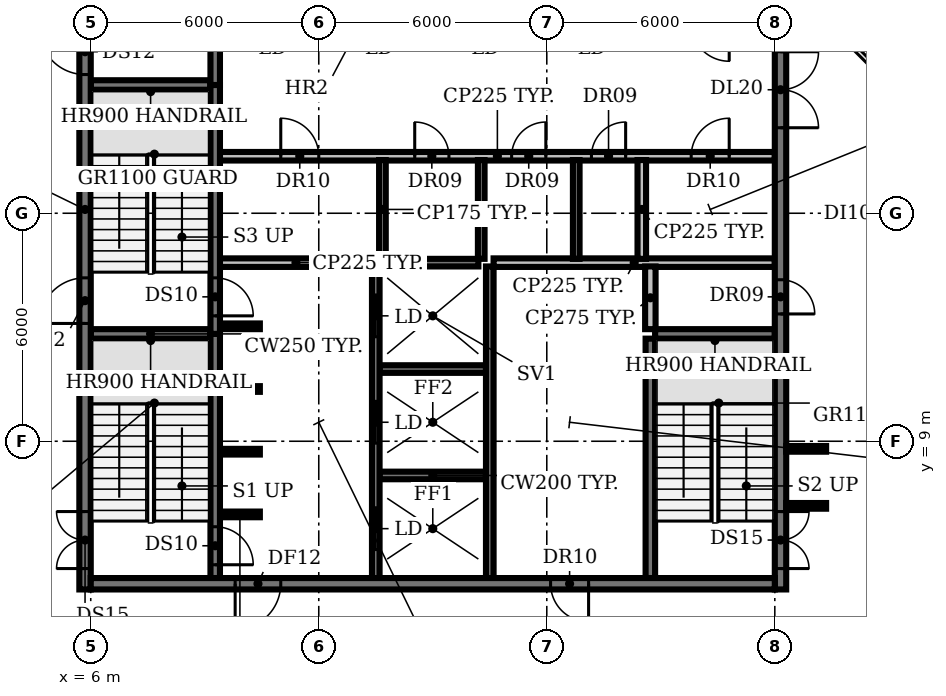
"""IFC4 building model, lengths in metres.
Left out: names, types, materials, properties, quantities, classifications, styles, units other than length and angle.
Written with IfcOpenShell. Run it as: python <this file> out.ifc"""

import sys

from ifc_helpers import new_model, si_unit, direction, frame, frame_2d, origin, place, context, subcontext, project, spatial, rectangle, extrude, element, fill, save


model = new_model("IFC4")
c1 = context("Model", 3, precision=1e-05, world=origin(), true_north=direction((0.0, 1.0)))
c2 = subcontext(c1, "Body", "Model", "MODEL_VIEW")
j1 = project(units=[si_unit("LENGTHUNIT", "METRE"), si_unit("PLANEANGLEUNIT", "RADIAN")], contexts=[c1])
p1 = place(None, origin())
s1 = spatial("IfcSite", under=j1, at=p1, CompositionType="ELEMENT")
p2 = place(p1, origin())
s2 = spatial("IfcBuilding", under=s1, at=p2, CompositionType="ELEMENT")
p3 = place(p2, frame((0.0, 0.0, 276.8)))
s3 = spatial("IfcBuildingStorey", under=s2, at=p3, CompositionType="ELEMENT", Elevation=276.8)
p4 = place(p3, frame((9.4, 7.075, 0.0), z_axis=(0.0, 0.0, 1.0), x_axis=(1.0, 0.0, 0.0)))
e1 = element("IfcWall", 1, at=p4, inside=s3, PredefinedType="SHEAR", context=c2, shape_type="SweptSolid", body=[
    extrude(rectangle(XDim=1.05, YDim=0.15, at=frame_2d((0.525, 0.0))), origin(), (0.0, 0.0, 1.0), 3.85),
])
p5 = place(p3, frame((13.6, 8.1, 0.0), z_axis=(0.0, 0.0, 1.0), x_axis=(1.0, 0.0, 0.0)))
e2 = element("IfcWall", 2, at=p5, inside=s3, PredefinedType="SHEAR", context=c2, shape_type="SweptSolid", body=[
    extrude(rectangle(XDim=2.8, YDim=0.2, at=frame_2d((1.4, 0.0))), origin(), (0.0, 0.0, 1.0), 3.85),
])
for number, where, z_axis, x_axis in (
    (3, (9.4, 8.725, 0.0), (0.0, 0.0, 1.0), (1.0, 0.0, 0.0)),
    (4, (9.4, 10.375, 0.0), (0.0, 0.0, 1.0), (1.0, 0.0, 0.0)),
):
    element("IfcWall", number, at=place(p3, frame(where, z_axis=z_axis, x_axis=x_axis)), inside=s3, PredefinedType="SHEAR", context=c2, shape_type="SweptSolid", body=[
        extrude(rectangle(XDim=1.05, YDim=0.15, at=frame_2d((0.525, 0.0))), origin(), (0.0, 0.0, 1.0), 3.85),
    ])
p6 = place(p3, frame((13.6, 10.9, 0.0), z_axis=(0.0, 0.0, 1.0), x_axis=(1.0, 0.0, 0.0)))
e5 = element("IfcWall", 5, at=p6, inside=s3, PredefinedType="SHEAR", context=c2, shape_type="SweptSolid", body=[
    extrude(rectangle(XDim=2.8, YDim=0.2, at=frame_2d((1.4, 0.0))), origin(), (0.0, 0.0, 1.0), 3.85),
])
for number, where, z_axis, x_axis in (
    (6, (6.0, 11.825, 0.0), (0.0, 0.0, 1.0), (1.0, 0.0, 0.0)),
    (7, (20.85, 11.825, 0.0), (0.0, 0.0, 1.0), (1.0, 0.0, 0.0)),
):
    element("IfcWall", number, at=place(p3, frame(where, z_axis=z_axis, x_axis=x_axis)), inside=s3, PredefinedType="SHEAR", context=c2, shape_type="SweptSolid", body=[
        extrude(rectangle(XDim=3.15, YDim=0.25, at=frame_2d((1.575, 0.0))), origin(), (0.0, 0.0, 1.0), 3.85),
    ])
p7 = place(p3, frame((9.4, 12.025, 0.0), z_axis=(0.0, 0.0, 1.0), x_axis=(1.0, 0.0, 0.0)))
e8 = element("IfcWall", 8, at=p7, inside=s3, PredefinedType="SHEAR", context=c2, shape_type="SweptSolid", body=[
    extrude(rectangle(XDim=1.05, YDim=0.15, at=frame_2d((0.525, 0.0))), origin(), (0.0, 0.0, 1.0), 3.85),
])
p8 = place(p3, frame((9.4, 13.7, 0.0), z_axis=(0.0, 0.0, 1.0), x_axis=(1.0, 0.0, 0.0)))
e9 = element("IfcWall", 9, at=p8, inside=s3, PredefinedType="PARTITIONING", context=c2, shape_type="SweptSolid", body=[
    extrude(rectangle(XDim=4.0, YDim=0.225, at=frame_2d((2.0, 0.0))), origin(), (0.0, 0.0, 1.0), 3.85),
])
p9 = place(p3, frame((13.75, 13.7, 0.0), z_axis=(0.0, 0.0, 1.0), x_axis=(1.0, 0.0, 0.0)))
e10 = element("IfcWall", 10, at=p9, inside=s3, PredefinedType="SHEAR", context=c2, shape_type="SweptSolid", body=[
    extrude(rectangle(XDim=2.45, YDim=0.2, at=frame_2d((1.225, 0.0))), origin(), (0.0, 0.0, 1.0), 3.85),
])
p10 = place(p3, frame((16.6, 13.7, 0.0), z_axis=(0.0, 0.0, 1.0), x_axis=(1.0, 0.0, 0.0)))
e11 = element("IfcWall", 11, at=p10, inside=s3, PredefinedType="PARTITIONING", context=c2, shape_type="SweptSolid", body=[
    extrude(rectangle(XDim=7.4, YDim=0.225, at=frame_2d((3.7, 0.0))), origin(), (0.0, 0.0, 1.0), 3.85),
])
p11 = place(p3, frame((9.4, 16.5, 0.0), z_axis=(0.0, 0.0, 1.0), x_axis=(1.0, 0.0, 0.0)))
e12 = element("IfcWall", 12, at=p11, inside=s3, PredefinedType="PARTITIONING", context=c2, shape_type="SweptSolid", body=[
    extrude(rectangle(XDim=14.6, YDim=0.225, at=frame_2d((7.3, 0.0))), origin(), (0.0, 0.0, 1.0), 3.85),
])
p12 = place(p11, frame((1.6, 0.0, 0.0)))
e13 = element("IfcOpeningElement", 13, at=p12, cuts=e12, PredefinedType="OPENING", context=c2, shape_type="SweptSolid", body=[
    extrude(rectangle(XDim=1.0, YDim=2.1, at=frame_2d((0.5, 1.05))), frame((0.0, 0.123, 0.0), z_axis=(0.0, -1.0, 0.0), x_axis=(1.0, 0.0, 0.0)), (0.0, 0.0, 1.0), 0.245),
])
p13 = place(p11, frame((5.125, 0.0, 0.0)))
e14 = element("IfcOpeningElement", 14, at=p13, cuts=e12, PredefinedType="OPENING", context=c2, shape_type="SweptSolid", body=[
    extrude(rectangle(XDim=0.9, YDim=2.1, at=frame_2d((0.45, 1.05))), frame((0.0, 0.123, 0.0), z_axis=(0.0, -1.0, 0.0), x_axis=(1.0, 0.0, 0.0)), (0.0, 0.0, 1.0), 0.245),
])
p14 = place(p11, frame((7.675, 0.0, 0.0)))
e15 = element("IfcOpeningElement", 15, at=p14, cuts=e12, PredefinedType="OPENING", context=c2, shape_type="SweptSolid", body=[
    extrude(rectangle(XDim=0.9, YDim=2.1, at=frame_2d((0.45, 1.05))), frame((0.0, 0.123, 0.0), z_axis=(0.0, -1.0, 0.0), x_axis=(1.0, 0.0, 0.0)), (0.0, 0.0, 1.0), 0.245),
])
p15 = place(p11, frame((9.775, 0.0, 0.0)))
e16 = element("IfcOpeningElement", 16, at=p15, cuts=e12, PredefinedType="OPENING", context=c2, shape_type="SweptSolid", body=[
    extrude(rectangle(XDim=0.9, YDim=2.1, at=frame_2d((0.45, 1.05))), frame((0.0, 0.123, 0.0), z_axis=(0.0, -1.0, 0.0), x_axis=(1.0, 0.0, 0.0)), (0.0, 0.0, 1.0), 0.245),
])
p16 = place(p11, frame((12.4, 0.0, 0.0)))
e17 = element("IfcOpeningElement", 17, at=p16, cuts=e12, PredefinedType="OPENING", context=c2, shape_type="SweptSolid", body=[
    extrude(rectangle(XDim=1.0, YDim=2.1, at=frame_2d((0.5, 1.05))), frame((0.0, 0.123, 0.0), z_axis=(0.0, -1.0, 0.0), x_axis=(1.0, 0.0, 0.0)), (0.0, 0.0, 1.0), 0.245),
])
p17 = place(p3, frame((6.0, 18.375, 0.0), z_axis=(0.0, 0.0, 1.0), x_axis=(1.0, 0.0, 0.0)))
e18 = element("IfcWall", 18, at=p17, inside=s3, PredefinedType="SHEAR", context=c2, shape_type="SweptSolid", body=[
    extrude(rectangle(XDim=3.15, YDim=0.25, at=frame_2d((1.575, 0.0))), origin(), (0.0, 0.0, 1.0), 3.85),
])
p18 = place(p3, frame((9.275, 11.825, 0.0), z_axis=(0.0, 0.0, 1.0), x_axis=(0.0, -1.0, 0.0)))
e19 = element("IfcWall", 19, at=p18, inside=s3, PredefinedType="SHEAR", context=c2, shape_type="SweptSolid", body=[
    extrude(rectangle(XDim=6.425, YDim=0.25, at=frame_2d((3.212, 0.0))), origin(), (0.0, 0.0, 1.0), 3.85),
])
p19 = place(p18, frame((5.075, 0.0, 0.0)))
e20 = element("IfcOpeningElement", 20, at=p19, cuts=e19, PredefinedType="OPENING", context=c2, shape_type="SweptSolid", body=[
    extrude(rectangle(XDim=1.0, YDim=2.1, at=frame_2d((0.5, 1.05))), frame((0.0, 0.135, 0.0), z_axis=(0.0, -1.0, 0.0), x_axis=(1.0, 0.0, 0.0)), (0.0, 0.0, 1.0), 0.27),
])
p20 = place(p3, frame((9.275, 18.375, 0.0), z_axis=(0.0, 0.0, 1.0), x_axis=(0.0, -1.0, 0.0)))
e21 = element("IfcWall", 21, at=p20, inside=s3, PredefinedType="SHEAR", context=c2, shape_type="SweptSolid", body=[
    extrude(rectangle(XDim=6.55, YDim=0.25, at=frame_2d((3.275, 0.0))), origin(), (0.0, 0.0, 1.0), 3.85),
])
p21 = place(p20, frame((5.075, 0.0, 0.0)))
e22 = element("IfcOpeningElement", 22, at=p21, cuts=e21, PredefinedType="OPENING", context=c2, shape_type="SweptSolid", body=[
    extrude(rectangle(XDim=1.0, YDim=2.1, at=frame_2d((0.5, 1.05))), frame((0.0, 0.135, 0.0), z_axis=(0.0, -1.0, 0.0), x_axis=(1.0, 0.0, 0.0)), (0.0, 0.0, 1.0), 0.27),
])
p22 = place(p3, frame((9.275, 18.375, 0.0), z_axis=(0.0, 0.0, 1.0), x_axis=(0.0, 1.0, 0.0)))
e23 = element("IfcWall", 23, at=p22, inside=s3, PredefinedType="SHEAR", context=c2, shape_type="SweptSolid", body=[
    extrude(rectangle(XDim=6.425, YDim=0.25, at=frame_2d((3.212, 0.0))), origin(), (0.0, 0.0, 1.0), 3.85),
])
p23 = place(p3, frame((13.5, 5.4, 0.0), z_axis=(0.0, 0.0, 1.0), x_axis=(0.0, 1.0, 0.0)))
e24 = element("IfcWall", 24, at=p23, inside=s3, PredefinedType="SHEAR", context=c2, shape_type="SweptSolid", body=[
    extrude(rectangle(XDim=8.2, YDim=0.2, at=frame_2d((4.1, 0.0))), origin(), (0.0, 0.0, 1.0), 3.85),
])
p24 = place(p23, frame((0.75, 0.0, 0.0)))
e25 = element("IfcOpeningElement", 25, at=p24, cuts=e24, PredefinedType="OPENING", context=c2, shape_type="SweptSolid", body=[
    extrude(rectangle(XDim=1.1, YDim=2.1, at=frame_2d((0.55, 1.05))), frame((0.0, 0.11, 0.0), z_axis=(0.0, -1.0, 0.0), x_axis=(1.0, 0.0, 0.0)), (0.0, 0.0, 1.0), 0.22),
])
p25 = place(p23, frame((3.55, 0.0, 0.0)))
e26 = element("IfcOpeningElement", 26, at=p25, cuts=e24, PredefinedType="OPENING", context=c2, shape_type="SweptSolid", body=[
    extrude(rectangle(XDim=1.1, YDim=2.1, at=frame_2d((0.55, 1.05))), frame((0.0, 0.11, 0.0), z_axis=(0.0, -1.0, 0.0), x_axis=(1.0, 0.0, 0.0)), (0.0, 0.0, 1.0), 0.22),
])
p26 = place(p23, frame((6.35, 0.0, 0.0)))
e27 = element("IfcOpeningElement", 27, at=p26, cuts=e24, PredefinedType="OPENING", context=c2, shape_type="SweptSolid", body=[
    extrude(rectangle(XDim=1.1, YDim=2.1, at=frame_2d((0.55, 1.05))), frame((0.0, 0.11, 0.0), z_axis=(0.0, -1.0, 0.0), x_axis=(1.0, 0.0, 0.0)), (0.0, 0.0, 1.0), 0.22),
])
for number, where, z_axis, x_axis in (
    (28, (13.675, 13.8, 0.0), (0.0, 0.0, 1.0), (0.0, 1.0, 0.0)),
    (29, (16.275, 13.8, 0.0), (0.0, 0.0, 1.0), (0.0, 1.0, 0.0)),
):
    element("IfcWall", number, at=place(p3, frame(where, z_axis=z_axis, x_axis=x_axis)), inside=s3, PredefinedType="PARTITIONING", context=c2, shape_type="SweptSolid", body=[
        extrude(rectangle(XDim=2.6, YDim=0.175, at=frame_2d((1.3, 0.0))), origin(), (0.0, 0.0, 1.0), 3.85),
    ])
p27 = place(p3, frame((16.5, 5.4, 0.0), z_axis=(0.0, 0.0, 1.0), x_axis=(0.0, 1.0, 0.0)))
e30 = element("IfcWall", 30, at=p27, inside=s3, PredefinedType="SHEAR", context=c2, shape_type="SweptSolid", body=[
    extrude(rectangle(XDim=8.2, YDim=0.2, at=frame_2d((4.1, 0.0))), origin(), (0.0, 0.0, 1.0), 3.85),
])
p28 = place(p3, frame((18.775, 13.8, 0.0), z_axis=(0.0, 0.0, 1.0), x_axis=(0.0, 1.0, 0.0)))
e31 = element("IfcWall", 31, at=p28, inside=s3, PredefinedType="PARTITIONING", context=c2, shape_type="SweptSolid", body=[
    extrude(rectangle(XDim=2.6, YDim=0.175, at=frame_2d((1.3, 0.0))), origin(), (0.0, 0.0, 1.0), 3.85),
])
p29 = place(p3, frame((20.5, 13.8, 0.0), z_axis=(0.0, 0.0, 1.0), x_axis=(0.0, 1.0, 0.0)))
e32 = element("IfcWall", 32, at=p29, inside=s3, PredefinedType="PARTITIONING", context=c2, shape_type="SweptSolid", body=[
    extrude(rectangle(XDim=2.6, YDim=0.225, at=frame_2d((1.3, 0.0))), origin(), (0.0, 0.0, 1.0), 3.85),
])
p30 = place(p3, frame((20.725, 5.4, 0.0), z_axis=(0.0, 0.0, 1.0), x_axis=(0.0, 1.0, 0.0)))
e33 = element("IfcWall", 33, at=p30, inside=s3, PredefinedType="SHEAR", context=c2, shape_type="SweptSolid", body=[
    extrude(rectangle(XDim=6.3, YDim=0.25, at=frame_2d((3.15, 0.0))), origin(), (0.0, 0.0, 1.0), 3.85),
])
p31 = place(p3, frame((20.725, 11.95, 0.0), z_axis=(0.0, 0.0, 1.0), x_axis=(0.0, 1.0, 0.0)))
e34 = element("IfcWall", 34, at=p31, inside=s3, PredefinedType="PARTITIONING", context=c2, shape_type="SweptSolid", body=[
    extrude(rectangle(XDim=1.65, YDim=0.275, at=frame_2d((0.825, 0.0))), origin(), (0.0, 0.0, 1.0), 3.85),
])
p32 = place(p3, frame((5.85, 5.1, 0.0), z_axis=(0.0, 0.0, 1.0), x_axis=(0.0, 1.0, 0.0)))
e35 = element("IfcWall", 35, at=p32, inside=s3, PredefinedType="SHEAR", context=c2, shape_type="SweptSolid", body=[
    extrude(rectangle(XDim=20.0, YDim=0.3, at=frame_2d((10.0, 0.0))), origin(), (0.0, 0.0, 1.0), 3.85),
])
p33 = place(p32, frame((0.55, 0.0, 0.0)))
e36 = element("IfcOpeningElement", 36, at=p33, cuts=e35, PredefinedType="OPENING", context=c2, shape_type="SweptSolid", body=[
    extrude(rectangle(XDim=1.5, YDim=2.1, at=frame_2d((0.75, 1.05))), frame((0.0, 0.16, 0.0), z_axis=(0.0, -1.0, 0.0), x_axis=(1.0, 0.0, 0.0)), (0.0, 0.0, 1.0), 0.32),
])
p34 = place(p32, frame((7.0, 0.0, 0.0)))
e37 = element("IfcOpeningElement", 37, at=p34, cuts=e35, PredefinedType="OPENING", context=c2, shape_type="SweptSolid", body=[
    extrude(rectangle(XDim=1.2, YDim=2.1, at=frame_2d((0.6, 1.05))), frame((0.0, 0.16, 0.0), z_axis=(0.0, -1.0, 0.0), x_axis=(1.0, 0.0, 0.0)), (0.0, 0.0, 1.0), 0.32),
])
p35 = place(p32, frame((13.55, 0.0, 0.0)))
e38 = element("IfcOpeningElement", 38, at=p35, cuts=e35, PredefinedType="OPENING", context=c2, shape_type="SweptSolid", body=[
    extrude(rectangle(XDim=1.2, YDim=2.1, at=frame_2d((0.6, 1.05))), frame((0.0, 0.16, 0.0), z_axis=(0.0, -1.0, 0.0), x_axis=(1.0, 0.0, 0.0)), (0.0, 0.0, 1.0), 0.32),
])
p36 = place(p3, frame((24.15, 25.655, 0.0), z_axis=(0.0, 0.0, 1.0), x_axis=(0.0, -1.0, 0.0)))
e39 = element("IfcWall", 39, at=p36, inside=s3, PredefinedType="SHEAR", context=c2, shape_type="SweptSolid", body=[
    extrude(rectangle(XDim=20.555, YDim=0.3, at=frame_2d((10.277, 0.0))), origin(), (0.0, 0.0, 1.0), 3.85),
])
p37 = place(p36, frame((18.505, 0.0, 0.0)))
e40 = element("IfcOpeningElement", 40, at=p37, cuts=e39, PredefinedType="OPENING", context=c2, shape_type="SweptSolid", body=[
    extrude(rectangle(XDim=1.5, YDim=2.1, at=frame_2d((0.75, 1.05))), frame((0.0, 0.16, 0.0), z_axis=(0.0, -1.0, 0.0), x_axis=(1.0, 0.0, 0.0)), (0.0, 0.0, 1.0), 0.32),
])
p38 = place(p36, frame((12.405, 0.0, 0.0)))
e41 = element("IfcOpeningElement", 41, at=p38, cuts=e39, PredefinedType="OPENING", context=c2, shape_type="SweptSolid", body=[
    extrude(rectangle(XDim=0.9, YDim=2.1, at=frame_2d((0.45, 1.05))), frame((0.0, 0.16, 0.0), z_axis=(0.0, -1.0, 0.0), x_axis=(1.0, 0.0, 0.0)), (0.0, 0.0, 1.0), 0.32),
])
p39 = place(p36, frame((6.405, 0.0, 0.0)))
e42 = element("IfcOpeningElement", 42, at=p39, cuts=e39, PredefinedType="OPENING", context=c2, shape_type="SweptSolid", body=[
    extrude(rectangle(XDim=2.0, YDim=2.1, at=frame_2d((1.0, 1.05))), frame((0.0, 0.16, 0.0), z_axis=(0.0, -1.0, 0.0), x_axis=(1.0, 0.0, 0.0)), (0.0, 0.0, 1.0), 0.32),
])
p40 = place(p3, frame((24.0, 5.25, 0.0), z_axis=(0.0, 0.0, 1.0), x_axis=(-1.0, 0.0, 0.0)))
e43 = element("IfcWall", 43, at=p40, inside=s3, PredefinedType="SHEAR", context=c2, shape_type="SweptSolid", body=[
    extrude(rectangle(XDim=18.0, YDim=0.3, at=frame_2d((9.0, 0.0))), origin(), (0.0, 0.0, 1.0), 3.85),
])
p41 = place(p40, frame((13.0, 0.0, 0.0)))
e44 = element("IfcOpeningElement", 44, at=p41, cuts=e43, PredefinedType="OPENING", context=c2, shape_type="SweptSolid", body=[
    extrude(rectangle(XDim=1.2, YDim=2.1, at=frame_2d((0.6, 1.05))), frame((0.0, 0.16, 0.0), z_axis=(0.0, -1.0, 0.0), x_axis=(1.0, 0.0, 0.0)), (0.0, 0.0, 1.0), 0.32),
])
p42 = place(p40, frame((4.9, 0.0, 0.0)))
e45 = element("IfcOpeningElement", 45, at=p42, cuts=e43, PredefinedType="OPENING", context=c2, shape_type="SweptSolid", body=[
    extrude(rectangle(XDim=1.0, YDim=2.1, at=frame_2d((0.5, 1.05))), frame((0.0, 0.16, 0.0), z_axis=(0.0, -1.0, 0.0), x_axis=(1.0, 0.0, 0.0)), (0.0, 0.0, 1.0), 0.32),
])
for number, where, z_axis, x_axis in (
    (46, (24.3, 7.3, 0.0), (0.0, 0.0, 1.0), (1.0, 0.0, 0.0)),
    (47, (24.3, 8.8, 0.0), (0.0, 0.0, 1.0), (1.0, 0.0, 0.0)),
):
    element("IfcWall", number, at=place(p3, frame(where, z_axis=z_axis, x_axis=x_axis)), inside=s3, PredefinedType="PARTITIONING", context=c2, shape_type="SweptSolid", body=[
        extrude(rectangle(XDim=1.05, YDim=0.15, at=frame_2d((0.525, 0.0))), origin(), (0.0, 0.0, 1.0), 2.9),
    ])
p43 = place(p12, origin())
e48 = element("IfcDoor", 48, at=p43, inside=s3, OperationType="SINGLE_SWING_LEFT", PredefinedType="DOOR", context=c2, shape_type="SweptSolid", body=[
    extrude(rectangle(XDim=1.0, YDim=2.1, at=frame_2d((0.5, 1.05))), frame((0.0, 0.025, 0.0), z_axis=(0.0, -1.0, 0.0), x_axis=(1.0, 0.0, 0.0)), (0.0, 0.0, 1.0), 0.05),
])
fill(e13, e48)
p44 = place(p13, origin())
e49 = element("IfcDoor", 49, at=p44, inside=s3, OperationType="SINGLE_SWING_LEFT", PredefinedType="DOOR", context=c2, shape_type="SweptSolid", body=[
    extrude(rectangle(XDim=0.9, YDim=2.1, at=frame_2d((0.45, 1.05))), frame((0.0, 0.025, 0.0), z_axis=(0.0, -1.0, 0.0), x_axis=(1.0, 0.0, 0.0)), (0.0, 0.0, 1.0), 0.05),
])
fill(e14, e49)
p45 = place(p14, origin())
e50 = element("IfcDoor", 50, at=p45, inside=s3, OperationType="SINGLE_SWING_RIGHT", PredefinedType="DOOR", context=c2, shape_type="SweptSolid", body=[
    extrude(rectangle(XDim=0.9, YDim=2.1, at=frame_2d((0.45, 1.05))), frame((0.0, 0.025, 0.0), z_axis=(0.0, -1.0, 0.0), x_axis=(1.0, 0.0, 0.0)), (0.0, 0.0, 1.0), 0.05),
])
fill(e15, e50)
p46 = place(p15, origin())
e51 = element("IfcDoor", 51, at=p46, inside=s3, OperationType="SINGLE_SWING_RIGHT", PredefinedType="DOOR", context=c2, shape_type="SweptSolid", body=[
    extrude(rectangle(XDim=0.9, YDim=2.1, at=frame_2d((0.45, 1.05))), frame((0.0, 0.025, 0.0), z_axis=(0.0, -1.0, 0.0), x_axis=(1.0, 0.0, 0.0)), (0.0, 0.0, 1.0), 0.05),
])
fill(e16, e51)
p47 = place(p16, origin())
e52 = element("IfcDoor", 52, at=p47, inside=s3, OperationType="SINGLE_SWING_RIGHT", PredefinedType="DOOR", context=c2, shape_type="SweptSolid", body=[
    extrude(rectangle(XDim=1.0, YDim=2.1, at=frame_2d((0.5, 1.05))), frame((0.0, 0.025, 0.0), z_axis=(0.0, -1.0, 0.0), x_axis=(1.0, 0.0, 0.0)), (0.0, 0.0, 1.0), 0.05),
])
fill(e17, e52)
p48 = place(p19, origin())
e53 = element("IfcDoor", 53, at=p48, inside=s3, OperationType="SINGLE_SWING_RIGHT", PredefinedType="DOOR", context=c2, shape_type="SweptSolid", body=[
    extrude(rectangle(XDim=1.0, YDim=2.1, at=frame_2d((0.5, 1.05))), frame((0.0, 0.025, 0.0), z_axis=(0.0, -1.0, 0.0), x_axis=(1.0, 0.0, 0.0)), (0.0, 0.0, 1.0), 0.05),
])
fill(e20, e53)
p49 = place(p21, origin())
e54 = element("IfcDoor", 54, at=p49, inside=s3, OperationType="SINGLE_SWING_RIGHT", PredefinedType="DOOR", context=c2, shape_type="SweptSolid", body=[
    extrude(rectangle(XDim=1.0, YDim=2.1, at=frame_2d((0.5, 1.05))), frame((0.0, 0.025, 0.0), z_axis=(0.0, -1.0, 0.0), x_axis=(1.0, 0.0, 0.0)), (0.0, 0.0, 1.0), 0.05),
])
fill(e22, e54)
p50 = place(p24, origin())
e55 = element("IfcDoor", 55, at=p50, inside=s3, OperationType="DOUBLE_DOOR_SLIDING", PredefinedType="DOOR", context=c2, shape_type="SweptSolid", body=[
    extrude(rectangle(XDim=1.1, YDim=2.1, at=frame_2d((0.55, 1.05))), frame((0.0, 0.025, 0.0), z_axis=(0.0, -1.0, 0.0), x_axis=(1.0, 0.0, 0.0)), (0.0, 0.0, 1.0), 0.05),
])
fill(e25, e55)
p51 = place(p25, origin())
e56 = element("IfcDoor", 56, at=p51, inside=s3, OperationType="DOUBLE_DOOR_SLIDING", PredefinedType="DOOR", context=c2, shape_type="SweptSolid", body=[
    extrude(rectangle(XDim=1.1, YDim=2.1, at=frame_2d((0.55, 1.05))), frame((0.0, 0.025, 0.0), z_axis=(0.0, -1.0, 0.0), x_axis=(1.0, 0.0, 0.0)), (0.0, 0.0, 1.0), 0.05),
])
fill(e26, e56)
p52 = place(p26, origin())
e57 = element("IfcDoor", 57, at=p52, inside=s3, OperationType="DOUBLE_DOOR_SLIDING", PredefinedType="DOOR", context=c2, shape_type="SweptSolid", body=[
    extrude(rectangle(XDim=1.1, YDim=2.1, at=frame_2d((0.55, 1.05))), frame((0.0, 0.025, 0.0), z_axis=(0.0, -1.0, 0.0), x_axis=(1.0, 0.0, 0.0)), (0.0, 0.0, 1.0), 0.05),
])
fill(e27, e57)
p53 = place(p33, origin())
e58 = element("IfcDoor", 58, at=p53, inside=s3, OperationType="DOUBLE_DOOR_SINGLE_SWING", PredefinedType="DOOR", context=c2, shape_type="SweptSolid", body=[
    extrude(rectangle(XDim=1.5, YDim=2.1, at=frame_2d((0.75, 1.05))), frame((0.0, 0.025, 0.0), z_axis=(0.0, -1.0, 0.0), x_axis=(1.0, 0.0, 0.0)), (0.0, 0.0, 1.0), 0.05),
])
fill(e36, e58)
p54 = place(p34, origin())
e59 = element("IfcDoor", 59, at=p54, inside=s3, OperationType="SINGLE_SWING_LEFT", PredefinedType="DOOR", context=c2, shape_type="SweptSolid", body=[
    extrude(rectangle(XDim=1.2, YDim=2.1, at=frame_2d((0.6, 1.05))), frame((0.0, 0.025, 0.0), z_axis=(0.0, -1.0, 0.0), x_axis=(1.0, 0.0, 0.0)), (0.0, 0.0, 1.0), 0.05),
])
fill(e37, e59)
p55 = place(p35, origin())
e60 = element("IfcDoor", 60, at=p55, inside=s3, OperationType="SINGLE_SWING_RIGHT", PredefinedType="DOOR", context=c2, shape_type="SweptSolid", body=[
    extrude(rectangle(XDim=1.2, YDim=2.1, at=frame_2d((0.6, 1.05))), frame((0.0, 0.025, 0.0), z_axis=(0.0, -1.0, 0.0), x_axis=(1.0, 0.0, 0.0)), (0.0, 0.0, 1.0), 0.05),
])
fill(e38, e60)
p56 = place(p37, origin())
e61 = element("IfcDoor", 61, at=p56, inside=s3, OperationType="DOUBLE_DOOR_SINGLE_SWING", PredefinedType="DOOR", context=c2, shape_type="SweptSolid", body=[
    extrude(rectangle(XDim=1.5, YDim=2.1, at=frame_2d((0.75, 1.05))), frame((0.0, 0.025, 0.0), z_axis=(0.0, -1.0, 0.0), x_axis=(1.0, 0.0, 0.0)), (0.0, 0.0, 1.0), 0.05),
])
fill(e40, e61)
p57 = place(p38, origin())
e62 = element("IfcDoor", 62, at=p57, inside=s3, OperationType="SINGLE_SWING_RIGHT", PredefinedType="DOOR", context=c2, shape_type="SweptSolid", body=[
    extrude(rectangle(XDim=0.9, YDim=2.1, at=frame_2d((0.45, 1.05))), frame((0.0, 0.025, 0.0), z_axis=(0.0, -1.0, 0.0), x_axis=(1.0, 0.0, 0.0)), (0.0, 0.0, 1.0), 0.05),
])
fill(e41, e62)
p58 = place(p39, origin())
e63 = element("IfcDoor", 63, at=p58, inside=s3, OperationType="DOUBLE_DOOR_SINGLE_SWING", PredefinedType="DOOR", context=c2, shape_type="SweptSolid", body=[
    extrude(rectangle(XDim=2.0, YDim=2.1, at=frame_2d((1.0, 1.05))), frame((0.0, 0.025, 0.0), z_axis=(0.0, -1.0, 0.0), x_axis=(1.0, 0.0, 0.0)), (0.0, 0.0, 1.0), 0.05),
])
fill(e42, e63)
p59 = place(p41, origin())
e64 = element("IfcDoor", 64, at=p59, inside=s3, OperationType="SINGLE_SWING_RIGHT", PredefinedType="DOOR", context=c2, shape_type="SweptSolid", body=[
    extrude(rectangle(XDim=1.2, YDim=2.1, at=frame_2d((0.6, 1.05))), frame((0.0, 0.025, 0.0), z_axis=(0.0, -1.0, 0.0), x_axis=(1.0, 0.0, 0.0)), (0.0, 0.0, 1.0), 0.05),
])
fill(e44, e64)
p60 = place(p42, origin())
e65 = element("IfcDoor", 65, at=p60, inside=s3, OperationType="SINGLE_SWING_LEFT", PredefinedType="DOOR", context=c2, shape_type="SweptSolid", body=[
    extrude(rectangle(XDim=1.0, YDim=2.1, at=frame_2d((0.5, 1.05))), frame((0.0, 0.025, 0.0), z_axis=(0.0, -1.0, 0.0), x_axis=(1.0, 0.0, 0.0)), (0.0, 0.0, 1.0), 0.05),
])
fill(e45, e65)
save(model, sys.argv[1])
